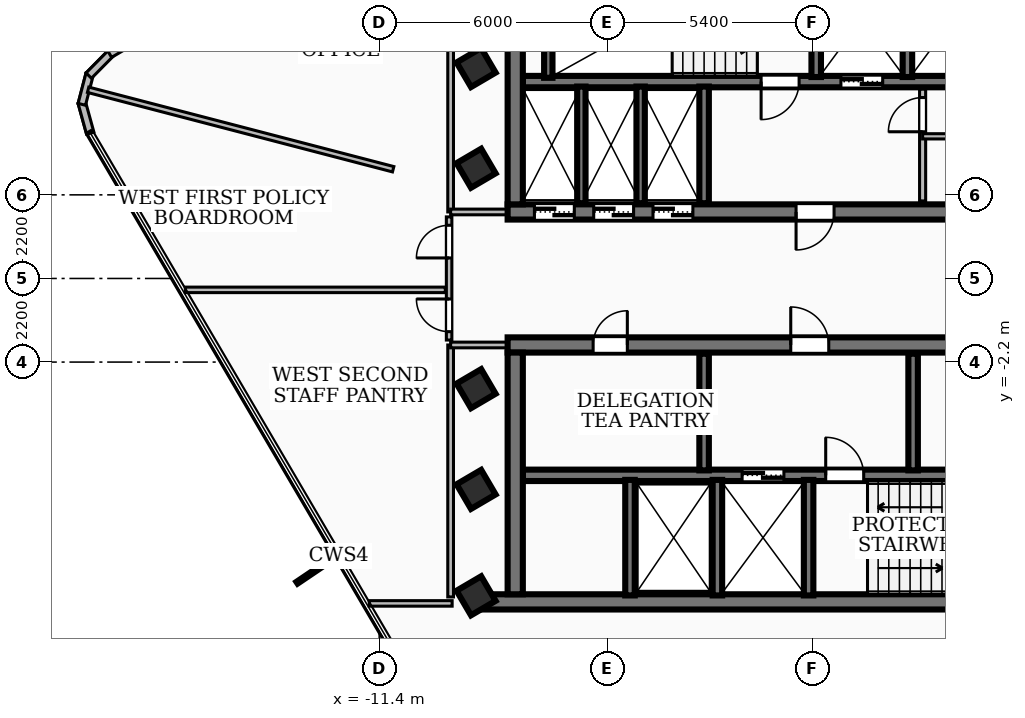
"""IFC4 building model, lengths in metres.
Left out: names, types, materials, properties, quantities, classifications, styles, units other than length and angle.
Written with IfcOpenShell. Run it as: python <this file> out.ifc"""

import sys

from ifc_helpers import new_model, si_unit, direction, frame, frame_2d, origin, origin_2d, place, context, subcontext, project, spatial, rectangle, extrude, element, fill, save


model = new_model("IFC4")
c1 = context("Model", 3, precision=1e-05, world=origin(), true_north=direction((0.0, 1.0)))
c2 = subcontext(c1, "Body", "Model", "MODEL_VIEW")
j1 = project(units=[si_unit("LENGTHUNIT", "METRE"), si_unit("PLANEANGLEUNIT", "RADIAN")], contexts=[c1])
p1 = place(None, origin())
s1 = spatial("IfcSite", under=j1, at=p1, CompositionType="ELEMENT")
p2 = place(p1, origin())
s2 = spatial("IfcBuilding", under=s1, at=p2, CompositionType="ELEMENT")
p3 = place(p2, frame((0.0, 0.0, 208.62)))
s3 = spatial("IfcBuildingStorey", under=s2, at=p3, CompositionType="ELEMENT", Elevation=208.62)
p4 = place(p3, frame((8.02, 1.75, 0.0), z_axis=(0.0, 0.0, 1.0), x_axis=(-1.0, 0.0, 0.0)))
e1 = element("IfcWall", 1, at=p4, inside=s3, PredefinedType="SHEAR", context=c2, shape_type="SweptSolid", body=[
    extrude(rectangle(XDim=16.04, YDim=0.4, at=frame_2d((8.02, 0.0))), origin(), (0.0, 0.0, 1.0), 3.16),
])
p5 = place(p4, frame((7.45, 0.0, 0.0)))
e2 = element("IfcOpeningElement", 2, at=p5, cuts=e1, PredefinedType="OPENING", context=c2, shape_type="SweptSolid", body=[
    extrude(rectangle(XDim=1.0, YDim=2.1, at=frame_2d((0.5, 1.05))), frame((0.0, 0.21, 0.0), z_axis=(0.0, -1.0, 0.0), x_axis=(1.0, 0.0, 0.0)), (0.0, 0.0, 1.0), 0.42),
])
p6 = place(p4, frame((14.285, 0.0, 0.0)))
e3 = element("IfcOpeningElement", 3, at=p6, cuts=e1, PredefinedType="OPENING", context=c2, shape_type="SweptSolid", body=[
    extrude(rectangle(XDim=1.05, YDim=2.15, at=frame_2d((0.525, 1.075))), frame((0.0, 0.21, 0.0), z_axis=(0.0, -1.0, 0.0), x_axis=(1.0, 0.0, 0.0)), (0.0, 0.0, 1.0), 0.42),
])
p7 = place(p4, frame((12.725, 0.0, 0.0)))
e4 = element("IfcOpeningElement", 4, at=p7, cuts=e1, PredefinedType="OPENING", context=c2, shape_type="SweptSolid", body=[
    extrude(rectangle(XDim=1.05, YDim=2.15, at=frame_2d((0.525, 1.075))), frame((0.0, 0.21, 0.0), z_axis=(0.0, -1.0, 0.0), x_axis=(1.0, 0.0, 0.0)), (0.0, 0.0, 1.0), 0.42),
])
p8 = place(p4, frame((11.165, 0.0, 0.0)))
e5 = element("IfcOpeningElement", 5, at=p8, cuts=e1, PredefinedType="OPENING", context=c2, shape_type="SweptSolid", body=[
    extrude(rectangle(XDim=1.05, YDim=2.15, at=frame_2d((0.525, 1.075))), frame((0.0, 0.21, 0.0), z_axis=(0.0, -1.0, 0.0), x_axis=(1.0, 0.0, 0.0)), (0.0, 0.0, 1.0), 0.42),
])
p9 = place(p4, frame((3.4, 0.0, 0.0)))
e6 = element("IfcOpeningElement", 6, at=p9, cuts=e1, PredefinedType="OPENING", context=c2, shape_type="SweptSolid", body=[
    extrude(rectangle(XDim=0.9, YDim=2.06, at=frame_2d((0.45, 1.03))), frame((0.0, 0.21, 0.0), z_axis=(0.0, -1.0, 0.0), x_axis=(1.0, 0.0, 0.0)), (0.0, 0.0, 1.0), 0.42),
])
p10 = place(p4, frame((1.1, 0.0, 0.0)))
e7 = element("IfcOpeningElement", 7, at=p10, cuts=e1, PredefinedType="OPENING", context=c2, shape_type="SweptSolid", body=[
    extrude(rectangle(XDim=0.9, YDim=2.06, at=frame_2d((0.45, 1.03))), frame((0.0, 0.21, 0.0), z_axis=(0.0, -1.0, 0.0), x_axis=(1.0, 0.0, 0.0)), (0.0, 0.0, 1.0), 0.42),
])
p11 = place(p3, frame((-7.82, 1.95, 0.0), z_axis=(0.0, 0.0, 1.0), x_axis=(0.0, 1.0, 0.0)))
e8 = element("IfcWall", 8, at=p11, inside=s3, PredefinedType="SHEAR", context=c2, shape_type="SweptSolid", body=[
    extrude(rectangle(XDim=6.36, YDim=0.4, at=frame_2d((3.18, 0.0))), origin(), (0.0, 0.0, 1.0), 3.16),
])
p12 = place(p3, frame((7.62, 5.18, 0.0), z_axis=(0.0, 0.0, 1.0), x_axis=(-1.0, 0.0, 0.0)))
e9 = element("IfcWall", 9, at=p12, inside=s3, PredefinedType="SOLIDWALL", context=c2, shape_type="SweptSolid", body=[
    extrude(rectangle(XDim=15.24, YDim=0.3, at=frame_2d((7.62, 0.0))), origin(), (0.0, 0.0, 1.0), 3.16),
])
p13 = place(p12, frame((5.77, 0.0, 0.0)))
e10 = element("IfcOpeningElement", 10, at=p13, cuts=e9, PredefinedType="OPENING", context=c2, shape_type="SweptSolid", body=[
    extrude(rectangle(XDim=1.1, YDim=2.15, at=frame_2d((0.55, 1.075))), frame((0.0, 0.16, 0.0), z_axis=(0.0, -1.0, 0.0), x_axis=(1.0, 0.0, 0.0)), (0.0, 0.0, 1.0), 0.32),
])
p14 = place(p12, frame((2.97, 0.0, 0.0)))
e11 = element("IfcOpeningElement", 11, at=p14, cuts=e9, PredefinedType="OPENING", context=c2, shape_type="SweptSolid", body=[
    extrude(rectangle(XDim=1.1, YDim=2.15, at=frame_2d((0.55, 1.075))), frame((0.0, 0.16, 0.0), z_axis=(0.0, -1.0, 0.0), x_axis=(1.0, 0.0, 0.0)), (0.0, 0.0, 1.0), 0.32),
])
p15 = place(p12, frame((7.97, 0.0, 0.0)))
e12 = element("IfcOpeningElement", 12, at=p15, cuts=e9, PredefinedType="OPENING", context=c2, shape_type="SweptSolid", body=[
    extrude(rectangle(XDim=1.0, YDim=2.1, at=frame_2d((0.5, 1.05))), frame((0.0, 0.16, 0.0), z_axis=(0.0, -1.0, 0.0), x_axis=(1.0, 0.0, 0.0)), (0.0, 0.0, 1.0), 0.32),
])
p16 = place(p3, frame((8.78, -8.51, 0.0), z_axis=(0.0, 0.0, 1.0), x_axis=(-1.0, 0.0, 0.0)))
e13 = element("IfcWall", 13, at=p16, inside=s3, PredefinedType="SHEAR", context=c2, shape_type="SweptSolid", body=[
    extrude(rectangle(XDim=17.56, YDim=0.4, at=frame_2d((8.78, 0.0))), origin(), (0.0, 0.0, 1.0), 3.16),
])
p17 = place(p3, frame((-8.02, -1.75, 0.0), z_axis=(0.0, 0.0, 1.0), x_axis=(1.0, 0.0, 0.0)))
e14 = element("IfcWall", 14, at=p17, inside=s3, PredefinedType="SHEAR", context=c2, shape_type="SweptSolid", body=[
    extrude(rectangle(XDim=16.04, YDim=0.4, at=frame_2d((8.02, 0.0))), origin(), (0.0, 0.0, 1.0), 3.16),
])
p18 = place(p17, frame((7.45, 0.0, 0.0)))
e15 = element("IfcOpeningElement", 15, at=p18, cuts=e14, PredefinedType="OPENING", context=c2, shape_type="SweptSolid", body=[
    extrude(rectangle(XDim=1.0, YDim=2.1, at=frame_2d((0.5, 1.05))), frame((0.0, 0.21, 0.0), z_axis=(0.0, -1.0, 0.0), x_axis=(1.0, 0.0, 0.0)), (0.0, 0.0, 1.0), 0.42),
])
p19 = place(p17, frame((12.65, 0.0, 0.0)))
e16 = element("IfcOpeningElement", 16, at=p19, cuts=e14, PredefinedType="OPENING", context=c2, shape_type="SweptSolid", body=[
    extrude(rectangle(XDim=0.9, YDim=2.06, at=frame_2d((0.45, 1.03))), frame((0.0, 0.21, 0.0), z_axis=(0.0, -1.0, 0.0), x_axis=(1.0, 0.0, 0.0)), (0.0, 0.0, 1.0), 0.42),
])
p20 = place(p17, frame((2.25, 0.0, 0.0)))
e17 = element("IfcOpeningElement", 17, at=p20, cuts=e14, PredefinedType="OPENING", context=c2, shape_type="SweptSolid", body=[
    extrude(rectangle(XDim=0.9, YDim=2.06, at=frame_2d((0.45, 1.03))), frame((0.0, 0.21, 0.0), z_axis=(0.0, -1.0, 0.0), x_axis=(1.0, 0.0, 0.0)), (0.0, 0.0, 1.0), 0.42),
])
p21 = place(p3, frame((-7.82, -8.31, 0.0), z_axis=(0.0, 0.0, 1.0), x_axis=(0.0, 1.0, 0.0)))
e18 = element("IfcWall", 18, at=p21, inside=s3, PredefinedType="SHEAR", context=c2, shape_type="SweptSolid", body=[
    extrude(rectangle(XDim=6.36, YDim=0.4, at=frame_2d((3.18, 0.0))), origin(), (0.0, 0.0, 1.0), 3.16),
])
p22 = place(p3, frame((-7.62, -5.18, 0.0), z_axis=(0.0, 0.0, 1.0), x_axis=(1.0, 0.0, 0.0)))
e19 = element("IfcWall", 19, at=p22, inside=s3, PredefinedType="SOLIDWALL", context=c2, shape_type="SweptSolid", body=[
    extrude(rectangle(XDim=15.24, YDim=0.3, at=frame_2d((7.62, 0.0))), origin(), (0.0, 0.0, 1.0), 3.16),
])
p23 = place(p22, frame((5.77, 0.0, 0.0)))
e20 = element("IfcOpeningElement", 20, at=p23, cuts=e19, PredefinedType="OPENING", context=c2, shape_type="SweptSolid", body=[
    extrude(rectangle(XDim=1.1, YDim=2.15, at=frame_2d((0.55, 1.075))), frame((0.0, 0.16, 0.0), z_axis=(0.0, -1.0, 0.0), x_axis=(1.0, 0.0, 0.0)), (0.0, 0.0, 1.0), 0.32),
])
p24 = place(p22, frame((7.97, 0.0, 0.0)))
e21 = element("IfcOpeningElement", 21, at=p24, cuts=e19, PredefinedType="OPENING", context=c2, shape_type="SweptSolid", body=[
    extrude(rectangle(XDim=1.0, YDim=2.1, at=frame_2d((0.5, 1.05))), frame((0.0, 0.16, 0.0), z_axis=(0.0, -1.0, 0.0), x_axis=(1.0, 0.0, 0.0)), (0.0, 0.0, 1.0), 0.32),
])
p25 = place(p3, frame((-6.95, 5.28, 0.0), z_axis=(0.0, 0.0, 1.0), x_axis=(0.0, 1.0, 0.0)))
e22 = element("IfcWall", 22, at=p25, inside=s3, PredefinedType="SOLIDWALL", context=c2, shape_type="SweptSolid", body=[
    extrude(rectangle(XDim=3.06, YDim=0.22, at=frame_2d((1.53, 0.0))), origin(), (0.0, 0.0, 1.0), 3.16),
])
for number, where, z_axis, x_axis in (
    (23, (0.1, 5.3, 0.0), (0.0, 0.0, 1.0), (0.0, 1.0, 0.0)),
    (24, (2.5, 5.3, 0.0), (0.0, 0.0, 1.0), (0.0, 1.0, 0.0)),
):
    element("IfcWall", number, at=place(p3, frame(where, z_axis=z_axis, x_axis=x_axis)), inside=s3, PredefinedType="SOLIDWALL", context=c2, shape_type="SweptSolid", body=[
        extrude(rectangle(XDim=3.04, YDim=0.25, at=frame_2d((1.52, 0.0))), origin(), (0.0, 0.0, 1.0), 3.16),
    ])
p26 = place(p3, frame((-2.85, 1.98, 0.0), z_axis=(0.0, 0.0, 1.0), x_axis=(0.0, 1.0, 0.0)))
e25 = element("IfcWall", 25, at=p26, inside=s3, PredefinedType="SOLIDWALL", context=c2, shape_type="SweptSolid", body=[
    extrude(rectangle(XDim=3.07, YDim=0.25, at=frame_2d((1.535, 0.0))), origin(), (0.0, 0.0, 1.0), 3.16),
])
for number, where, z_axis, x_axis in (
    (26, (-0.1, -8.34, 0.0), (0.0, 0.0, 1.0), (0.0, 1.0, 0.0)),
    (27, (-2.5, -8.34, 0.0), (0.0, 0.0, 1.0), (0.0, 1.0, 0.0)),
    (28, (-4.8, -8.34, 0.0), (0.0, 0.0, 1.0), (0.0, 1.0, 0.0)),
):
    element("IfcWall", number, at=place(p3, frame(where, z_axis=z_axis, x_axis=x_axis)), inside=s3, PredefinedType="SOLIDWALL", context=c2, shape_type="SweptSolid", body=[
        extrude(rectangle(XDim=3.04, YDim=0.25, at=frame_2d((1.52, 0.0))), origin(), (0.0, 0.0, 1.0), 3.16),
    ])
for number, where, z_axis, x_axis in (
    (29, (-2.85, -5.05, 0.0), (0.0, 0.0, 1.0), (0.0, 1.0, 0.0)),
    (30, (2.65, -5.05, 0.0), (0.0, 0.0, 1.0), (0.0, 1.0, 0.0)),
):
    element("IfcWall", number, at=place(p3, frame(where, z_axis=z_axis, x_axis=x_axis)), inside=s3, PredefinedType="SOLIDWALL", context=c2, shape_type="SweptSolid", body=[
        extrude(rectangle(XDim=3.07, YDim=0.25, at=frame_2d((1.535, 0.0))), origin(), (0.0, 0.0, 1.0), 3.16),
    ])
for number, where, z_axis, x_axis in (
    (31, (-6.08, 1.98, 0.0), (0.0, 0.0, 1.0), (0.0, 1.0, 0.0)),
    (32, (-4.52, 1.98, 0.0), (0.0, 0.0, 1.0), (0.0, 1.0, 0.0)),
):
    element("IfcWall", number, at=place(p3, frame(where, z_axis=z_axis, x_axis=x_axis)), inside=s3, PredefinedType="SOLIDWALL", context=c2, shape_type="SweptSolid", body=[
        extrude(rectangle(XDim=3.07, YDim=0.22, at=frame_2d((1.535, 0.0))), origin(), (0.0, 0.0, 1.0), 3.16),
    ])
for number, where, z_axis, x_axis in (
    (33, (-8.85, -5.55, 0.0), (0.0, 0.0, 1.0), (0.863, 0.506, 0.0)),
    (34, (-8.85, -2.9, 0.0), (0.0, 0.0, 1.0), (0.863, 0.506, 0.0)),
    (35, (-8.85, 2.9, 0.0), (0.0, 0.0, 1.0), (0.863, 0.506, 0.0)),
    (36, (-8.85, 5.55, 0.0), (0.0, 0.0, 1.0), (0.863, 0.506, 0.0)),
    (37, (-8.85, -8.35, 0.0), (0.0, 0.0, 1.0), (0.863, 0.506, 0.0)),
):
    element("IfcColumn", number, at=place(p3, frame(where, z_axis=z_axis, x_axis=x_axis)), inside=s3, PredefinedType="COLUMN", context=c2, shape_type="SweptSolid", body=[
        extrude(rectangle(XDim=0.75, YDim=0.75, at=origin_2d()), origin(), (0.0, 0.0, 1.0), 3.42),
    ])
p27 = place(p3, frame((-19.003, 3.822, 0.0), z_axis=(0.0, 0.0, 1.0), x_axis=(-0.266246353668, 0.963905015631, 0.0)))
e38 = element("IfcWall", 38, at=p27, inside=s3, PredefinedType="SOLIDWALL", context=c2, shape_type="SweptSolid", body=[
    extrude(rectangle(XDim=0.838, YDim=0.2, at=frame_2d((0.419, 0.0))), origin(), (0.0, 0.0, 1.0), 3.16),
])
p28 = place(p3, frame((-19.225, 4.582, 0.0), z_axis=(0.0, 0.0, 1.0), x_axis=(0.251167733737, 0.967943577658, 0.0)))
e39 = element("IfcWall", 39, at=p28, inside=s3, PredefinedType="SOLIDWALL", context=c2, shape_type="SweptSolid", body=[
    extrude(rectangle(XDim=0.824, YDim=0.2, at=frame_2d((0.412, 0.0))), origin(), (0.0, 0.0, 1.0), 3.16),
])
p29 = place(p3, frame((-19.042, 5.338, 0.0), z_axis=(0.0, 0.0, 1.0), x_axis=(0.702877524881, 0.711310891957, 0.0)))
e40 = element("IfcWall", 40, at=p29, inside=s3, PredefinedType="SOLIDWALL", context=c2, shape_type="SweptSolid", body=[
    extrude(rectangle(XDim=0.84, YDim=0.2, at=frame_2d((0.42, 0.0))), origin(), (0.0, 0.0, 1.0), 3.16),
])
p30 = place(p3, frame((-18.492, 5.904, 0.0), z_axis=(0.0, 0.0, 1.0), x_axis=(0.86245977502, 0.506125613333, 0.0)))
e41 = element("IfcWall", 41, at=p30, inside=s3, PredefinedType="SOLIDWALL", context=c2, shape_type="SweptSolid", body=[
    extrude(rectangle(XDim=6.741, YDim=0.2, at=frame_2d((3.371, 0.0))), origin(), (0.0, 0.0, 1.0), 3.16),
])
p31 = place(p3, frame((2.9, 2.04, 0.0), z_axis=(0.0, 0.0, 1.0), x_axis=(0.0, 1.0, 0.0)))
e42 = element("IfcWall", 42, at=p31, inside=s3, PredefinedType="PARTITIONING", context=c2, shape_type="SweptSolid", body=[
    extrude(rectangle(XDim=2.94, YDim=0.16, at=frame_2d((1.47, 0.0))), origin(), (0.0, 0.0, 1.0), 2.39),
])
p32 = place(p31, frame((1.82, 0.0, 0.0)))
e43 = element("IfcOpeningElement", 43, at=p32, cuts=e42, PredefinedType="OPENING", context=c2, shape_type="SweptSolid", body=[
    extrude(rectangle(XDim=0.9, YDim=2.06, at=frame_2d((0.45, 1.03))), frame((0.0, 0.09, 0.0), z_axis=(0.0, -1.0, 0.0), x_axis=(1.0, 0.0, 0.0)), (0.0, 0.0, 1.0), 0.18),
])
p33 = place(p3, frame((2.9, 3.74, 0.0), z_axis=(0.0, 0.0, 1.0), x_axis=(1.0, 0.0, 0.0)))
e44 = element("IfcWall", 44, at=p33, inside=s3, PredefinedType="PARTITIONING", context=c2, shape_type="SweptSolid", body=[
    extrude(rectangle(XDim=4.65, YDim=0.138, at=frame_2d((2.325, 0.0))), origin(), (0.0, 0.0, 1.0), 3.16),
])
p34 = place(p3, frame((-9.52, 1.75, 0.0), z_axis=(0.0, 0.0, 1.0), x_axis=(0.0, 1.0, 0.0)))
e45 = element("IfcWall", 45, at=p34, inside=s3, PredefinedType="PARTITIONING", context=c2, shape_type="SweptSolid", body=[
    extrude(rectangle(XDim=6.63, YDim=0.15, at=frame_2d((3.315, 0.0))), origin(), (0.0, 0.0, 1.0), 3.16),
])
p35 = place(p3, frame((-7.85, 1.75, 0.0), z_axis=(0.0, 0.0, 1.0), x_axis=(-1.0, 0.0, 0.0)))
e46 = element("IfcWall", 46, at=p35, inside=s3, PredefinedType="PARTITIONING", context=c2, shape_type="SweptSolid", body=[
    extrude(rectangle(XDim=1.67, YDim=0.15, at=frame_2d((0.835, 0.0))), origin(), (0.0, 0.0, 1.0), 2.39),
])
p36 = place(p3, frame((-9.52, -8.38, 0.0), z_axis=(0.0, 0.0, 1.0), x_axis=(0.0, 1.0, 0.0)))
e47 = element("IfcWall", 47, at=p36, inside=s3, PredefinedType="PARTITIONING", context=c2, shape_type="SweptSolid", body=[
    extrude(rectangle(XDim=6.63, YDim=0.15, at=frame_2d((3.315, 0.0))), origin(), (0.0, 0.0, 1.0), 3.16),
])
p37 = place(p3, frame((-7.85, -1.75, 0.0), z_axis=(0.0, 0.0, 1.0), x_axis=(-1.0, 0.0, 0.0)))
e48 = element("IfcWall", 48, at=p37, inside=s3, PredefinedType="PARTITIONING", context=c2, shape_type="SweptSolid", body=[
    extrude(rectangle(XDim=1.67, YDim=0.15, at=frame_2d((0.835, 0.0))), origin(), (0.0, 0.0, 1.0), 2.39),
])
p38 = place(p3, frame((-16.502, -0.3, 0.0), z_axis=(0.0, 0.0, 1.0), x_axis=(1.0, 0.0, 0.0)))
e49 = element("IfcWall", 49, at=p38, inside=s3, PredefinedType="PARTITIONING", context=c2, shape_type="SweptSolid", body=[
    extrude(rectangle(XDim=6.842, YDim=0.145, at=frame_2d((3.421, 0.0))), origin(), (0.0, 0.0, 1.0), 3.16),
])
p39 = place(p3, frame((-11.662, -8.55, 0.0), z_axis=(0.0, 0.0, 1.0), x_axis=(1.0, 0.0, 0.0)))
e50 = element("IfcWall", 50, at=p39, inside=s3, PredefinedType="PARTITIONING", context=c2, shape_type="SweptSolid", body=[
    extrude(rectangle(XDim=2.182, YDim=0.145, at=frame_2d((1.091, 0.0))), origin(), (0.0, 0.0, 1.0), 3.16),
])
p40 = place(p3, frame((-9.56, -1.62, 0.0), z_axis=(0.0, 0.0, 1.0), x_axis=(0.0, 1.0, 0.0)))
e51 = element("IfcWall", 51, at=p40, inside=s3, PredefinedType="PARTITIONING", context=c2, shape_type="SweptSolid", body=[
    extrude(rectangle(XDim=3.24, YDim=0.145, at=frame_2d((1.62, 0.0))), origin(), (0.0, 0.0, 1.0), 3.16),
])
p41 = place(p40, frame((0.22, 0.0, 0.0)))
e52 = element("IfcOpeningElement", 52, at=p41, cuts=e51, PredefinedType="OPENING", context=c2, shape_type="SweptSolid", body=[
    extrude(rectangle(XDim=0.86, YDim=2.04, at=frame_2d((0.43, 1.02))), frame((0.0, 0.083, 0.0), z_axis=(0.0, -1.0, 0.0), x_axis=(1.0, 0.0, 0.0)), (0.0, 0.0, 1.0), 0.165),
])
p42 = place(p40, frame((2.16, 0.0, 0.0)))
e53 = element("IfcOpeningElement", 53, at=p42, cuts=e51, PredefinedType="OPENING", context=c2, shape_type="SweptSolid", body=[
    extrude(rectangle(XDim=0.86, YDim=2.04, at=frame_2d((0.43, 1.02))), frame((0.0, 0.083, 0.0), z_axis=(0.0, -1.0, 0.0), x_axis=(1.0, 0.0, 0.0)), (0.0, 0.0, 1.0), 0.165),
])
p43 = place(p3, frame((-11.032, 2.874, 0.0), z_axis=(0.0, 0.0, 1.0), x_axis=(-0.967704417597, 0.252087604146, 0.0)))
e54 = element("IfcWall", 54, at=p43, inside=s3, PredefinedType="PARTITIONING", context=c2, shape_type="SweptSolid", body=[
    extrude(rectangle(XDim=8.295, YDim=0.145, at=frame_2d((4.147, 0.0))), origin(), (0.0, 0.0, 1.0), 3.16),
])
p44 = place(p3, frame((15.873, -7.255, 0.0), z_axis=(0.0, 0.0, 1.0), x_axis=(-0.862498672631, -0.506059324299, 0.0)))
e55 = element("IfcWall", 55, at=p44, inside=s3, PredefinedType="PARTITIONING", context=c2, shape_type="SweptSolid", body=[
    extrude(rectangle(XDim=20.039, YDim=0.145, at=frame_2d((10.02, 0.0))), origin(), (0.0, 0.0, 1.0), 2.53),
])
p45 = place(p44, frame((9.42, 0.0, 0.0)))
e56 = element("IfcOpeningElement", 56, at=p45, cuts=e55, PredefinedType="OPENING", context=c2, shape_type="SweptSolid", body=[
    extrude(rectangle(XDim=1.2, YDim=2.1, at=frame_2d((0.6, 1.05))), frame((0.0, 0.083, 0.0), z_axis=(0.0, -1.0, 0.0), x_axis=(1.0, 0.0, 0.0)), (0.0, 0.0, 1.0), 0.165),
])
p46 = place(p5, origin())
e57 = element("IfcDoor", 57, at=p46, inside=s3, OperationType="SINGLE_SWING_RIGHT", PredefinedType="DOOR", context=c2, shape_type="SweptSolid", body=[
    extrude(rectangle(XDim=1.0, YDim=2.1, at=frame_2d((0.5, 1.05))), frame((0.0, 0.025, 0.0), z_axis=(0.0, -1.0, 0.0), x_axis=(1.0, 0.0, 0.0)), (0.0, 0.0, 1.0), 0.05),
])
fill(e2, e57)
p47 = place(p18, origin())
e58 = element("IfcDoor", 58, at=p47, inside=s3, OperationType="SINGLE_SWING_LEFT", PredefinedType="DOOR", context=c2, shape_type="SweptSolid", body=[
    extrude(rectangle(XDim=1.0, YDim=2.1, at=frame_2d((0.5, 1.05))), frame((0.0, 0.025, 0.0), z_axis=(0.0, -1.0, 0.0), x_axis=(1.0, 0.0, 0.0)), (0.0, 0.0, 1.0), 0.05),
])
fill(e15, e58)
p48 = place(p13, origin())
e59 = element("IfcDoor", 59, at=p48, inside=s3, OperationType="DOUBLE_DOOR_SLIDING", PredefinedType="DOOR", context=c2, shape_type="SweptSolid", body=[
    extrude(rectangle(XDim=1.1, YDim=2.15, at=frame_2d((0.55, 1.075))), frame((0.0, 0.025, 0.0), z_axis=(0.0, -1.0, 0.0), x_axis=(1.0, 0.0, 0.0)), (0.0, 0.0, 1.0), 0.05),
])
fill(e10, e59)
p49 = place(p15, origin())
e60 = element("IfcDoor", 60, at=p49, inside=s3, OperationType="SINGLE_SWING_RIGHT", PredefinedType="DOOR", context=c2, shape_type="SweptSolid", body=[
    extrude(rectangle(XDim=1.0, YDim=2.1, at=frame_2d((0.5, 1.05))), frame((0.0, 0.025, 0.0), z_axis=(0.0, -1.0, 0.0), x_axis=(1.0, 0.0, 0.0)), (0.0, 0.0, 1.0), 0.05),
])
fill(e12, e60)
p50 = place(p23, origin())
e61 = element("IfcDoor", 61, at=p50, inside=s3, OperationType="DOUBLE_DOOR_SLIDING", PredefinedType="DOOR", context=c2, shape_type="SweptSolid", body=[
    extrude(rectangle(XDim=1.1, YDim=2.15, at=frame_2d((0.55, 1.075))), frame((0.0, 0.025, 0.0), z_axis=(0.0, -1.0, 0.0), x_axis=(1.0, 0.0, 0.0)), (0.0, 0.0, 1.0), 0.05),
])
fill(e20, e61)
p51 = place(p24, origin())
e62 = element("IfcDoor", 62, at=p51, inside=s3, OperationType="SINGLE_SWING_LEFT", PredefinedType="DOOR", context=c2, shape_type="SweptSolid", body=[
    extrude(rectangle(XDim=1.0, YDim=2.1, at=frame_2d((0.5, 1.05))), frame((0.0, 0.025, 0.0), z_axis=(0.0, -1.0, 0.0), x_axis=(1.0, 0.0, 0.0)), (0.0, 0.0, 1.0), 0.05),
])
fill(e21, e62)
p52 = place(p6, origin())
e63 = element("IfcDoor", 63, at=p52, inside=s3, OperationType="DOUBLE_DOOR_SLIDING", PredefinedType="DOOR", context=c2, shape_type="SweptSolid", body=[
    extrude(rectangle(XDim=1.05, YDim=2.15, at=frame_2d((0.525, 1.075))), frame((0.0, 0.025, 0.0), z_axis=(0.0, -1.0, 0.0), x_axis=(1.0, 0.0, 0.0)), (0.0, 0.0, 1.0), 0.05),
])
fill(e3, e63)
p53 = place(p7, origin())
e64 = element("IfcDoor", 64, at=p53, inside=s3, OperationType="DOUBLE_DOOR_SLIDING", PredefinedType="DOOR", context=c2, shape_type="SweptSolid", body=[
    extrude(rectangle(XDim=1.05, YDim=2.15, at=frame_2d((0.525, 1.075))), frame((0.0, 0.025, 0.0), z_axis=(0.0, -1.0, 0.0), x_axis=(1.0, 0.0, 0.0)), (0.0, 0.0, 1.0), 0.05),
])
fill(e4, e64)
p54 = place(p8, origin())
e65 = element("IfcDoor", 65, at=p54, inside=s3, OperationType="DOUBLE_DOOR_SLIDING", PredefinedType="DOOR", context=c2, shape_type="SweptSolid", body=[
    extrude(rectangle(XDim=1.05, YDim=2.15, at=frame_2d((0.525, 1.075))), frame((0.0, 0.025, 0.0), z_axis=(0.0, -1.0, 0.0), x_axis=(1.0, 0.0, 0.0)), (0.0, 0.0, 1.0), 0.05),
])
fill(e5, e65)
p55 = place(p20, origin())
e66 = element("IfcDoor", 66, at=p55, inside=s3, OperationType="SINGLE_SWING_RIGHT", PredefinedType="DOOR", context=c2, shape_type="SweptSolid", body=[
    extrude(rectangle(XDim=0.9, YDim=2.06, at=frame_2d((0.45, 1.03))), frame((0.0, 0.025, 0.0), z_axis=(0.0, -1.0, 0.0), x_axis=(1.0, 0.0, 0.0)), (0.0, 0.0, 1.0), 0.05),
])
fill(e17, e66)
p56 = place(p32, origin())
e67 = element("IfcDoor", 67, at=p56, inside=s3, OperationType="SINGLE_SWING_LEFT", PredefinedType="DOOR", context=c2, shape_type="SweptSolid", body=[
    extrude(rectangle(XDim=0.9, YDim=2.06, at=frame_2d((0.45, 1.03))), frame((0.0, 0.025, 0.0), z_axis=(0.0, -1.0, 0.0), x_axis=(1.0, 0.0, 0.0)), (0.0, 0.0, 1.0), 0.05),
])
fill(e43, e67)
p57 = place(p41, origin())
e68 = element("IfcDoor", 68, at=p57, inside=s3, OperationType="SINGLE_SWING_RIGHT", PredefinedType="DOOR", context=c2, shape_type="SweptSolid", body=[
    extrude(rectangle(XDim=0.86, YDim=2.04, at=frame_2d((0.43, 1.02))), frame((0.0, 0.025, 0.0), z_axis=(0.0, -1.0, 0.0), x_axis=(1.0, 0.0, 0.0)), (0.0, 0.0, 1.0), 0.05),
])
fill(e52, e68)
p58 = place(p42, origin())
e69 = element("IfcDoor", 69, at=p58, inside=s3, OperationType="SINGLE_SWING_LEFT", PredefinedType="DOOR", context=c2, shape_type="SweptSolid", body=[
    extrude(rectangle(XDim=0.86, YDim=2.04, at=frame_2d((0.43, 1.02))), frame((0.0, 0.025, 0.0), z_axis=(0.0, -1.0, 0.0), x_axis=(1.0, 0.0, 0.0)), (0.0, 0.0, 1.0), 0.05),
])
fill(e53, e69)
save(model, sys.argv[1])
